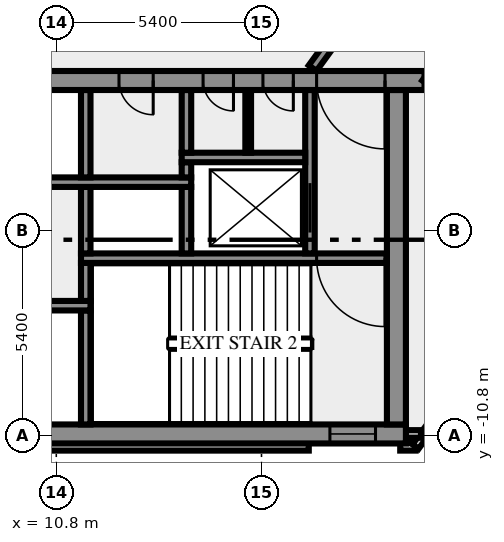
"""IFC4 building model, lengths in metres.
Left out: names, types, materials, properties, quantities, classifications, styles, units other than length and angle.
Written with IfcOpenShell. Run it as: python <this file> out.ifc"""

import sys

from ifc_helpers import new_model, si_unit, direction, frame, frame_2d, origin, place, context, subcontext, project, spatial, rectangle, extrude, element, fill, save


model = new_model("IFC4")
c1 = context("Model", 3, precision=1e-05, world=origin(), true_north=direction((0.0, 1.0)))
c2 = subcontext(c1, "Body", "Model", "MODEL_VIEW")
j1 = project(units=[si_unit("LENGTHUNIT", "METRE"), si_unit("PLANEANGLEUNIT", "RADIAN")], contexts=[c1])
p1 = place(None, origin())
s1 = spatial("IfcSite", under=j1, at=p1, CompositionType="ELEMENT")
p2 = place(p1, origin())
s2 = spatial("IfcBuilding", under=s1, at=p2, CompositionType="ELEMENT")
p3 = place(p2, frame((0.0, 0.0, 67.0)))
s3 = spatial("IfcBuildingStorey", under=s2, at=p3, CompositionType="ELEMENT", Elevation=67.0)
p4 = place(p3, frame((-17.444, -11.088, 0.0), z_axis=(0.0, 0.0, 1.0), x_axis=(1.0, 0.0, 0.0)))
e1 = element("IfcWall", 1, at=p4, inside=s3, PredefinedType="SOLIDWALL", context=c2, shape_type="SweptSolid", body=[
    extrude(rectangle(XDim=34.888, YDim=0.2, at=frame_2d((17.444, 0.0))), origin(), (0.0, 0.0, 1.0), 3.65),
])
p5 = place(p3, frame((19.85, -11.088, 0.0), z_axis=(0.0, 0.0, 1.0), x_axis=(1.0, 0.0, 0.0)))
e2 = element("IfcWall", 2, at=p5, inside=s3, PredefinedType="SOLIDWALL", context=c2, shape_type="SweptSolid", body=[
    extrude(rectangle(XDim=0.406, YDim=0.2, at=frame_2d((0.203, 0.0))), origin(), (0.0, 0.0, 1.0), 3.65),
])
p6 = place(p3, frame((20.253, -11.083, 0.0), z_axis=(0.0, 0.0, 1.0), x_axis=(0.587766567315, 0.809030569476, 0.0)))
e3 = element("IfcWall", 3, at=p6, inside=s3, PredefinedType="SOLIDWALL", context=c2, shape_type="SweptSolid", body=[
    extrude(rectangle(XDim=2.688, YDim=0.2, at=frame_2d((1.344, 0.0))), origin(), (0.0, 0.0, 1.0), 3.65),
])
p7 = place(p3, frame((19.98, -10.75, 0.0), z_axis=(0.0, 0.0, 1.0), x_axis=(1.0, 0.0, 0.0)))
e4 = element("IfcWall", 4, at=p7, inside=s3, PredefinedType="SOLIDWALL", context=c2, shape_type="SweptSolid", body=[
    extrude(rectangle(XDim=0.417, YDim=0.2, at=frame_2d((0.208, 0.0))), origin(), (0.0, 0.0, 1.0), 3.65),
])
p8 = place(p3, frame((-20.0, -10.75, 0.0), z_axis=(0.0, 0.0, 1.0), x_axis=(1.0, 0.0, 0.0)))
e5 = element("IfcWall", 5, at=p8, inside=s3, PredefinedType="SHEAR", context=c2, shape_type="SweptSolid", body=[
    extrude(rectangle(XDim=40.0, YDim=0.5, at=frame_2d((20.0, 0.0))), origin(), (0.0, 0.0, 1.0), 3.65),
])
p9 = place(p8, frame((0.8, 0.0, 1.0)))
e6 = element("IfcOpeningElement", 6, at=p9, cuts=e5, PredefinedType="OPENING", context=c2, shape_type="SweptSolid", body=[
    extrude(rectangle(XDim=1.2, YDim=1.2, at=frame_2d((0.6, 0.6))), frame((0.0, 0.26, 0.0), z_axis=(0.0, -1.0, 0.0), x_axis=(1.0, 0.0, 0.0)), (0.0, 0.0, 1.0), 0.52),
])
p10 = place(p8, frame((38.0, 0.0, 1.0)))
e7 = element("IfcOpeningElement", 7, at=p10, cuts=e5, PredefinedType="OPENING", context=c2, shape_type="SweptSolid", body=[
    extrude(rectangle(XDim=1.2, YDim=1.2, at=frame_2d((0.6, 0.6))), frame((0.0, 0.26, 0.0), z_axis=(0.0, -1.0, 0.0), x_axis=(1.0, 0.0, 0.0)), (0.0, 0.0, 1.0), 0.52),
])
p11 = place(p3, frame((11.575, -10.5, 0.0), z_axis=(0.0, 0.0, 1.0), x_axis=(0.0, 1.0, 0.0)))
e8 = element("IfcWall", 8, at=p11, inside=s3, PredefinedType="SHEAR", context=c2, shape_type="SweptSolid", body=[
    extrude(rectangle(XDim=3.0, YDim=0.25, at=frame_2d((1.5, 0.0))), origin(), (0.0, 0.0, 1.0), 3.65),
])
p12 = place(p3, frame((19.75, -10.5, 0.0), z_axis=(0.0, 0.0, 1.0), x_axis=(0.0, 1.0, 0.0)))
e9 = element("IfcWall", 9, at=p12, inside=s3, PredefinedType="SHEAR", context=c2, shape_type="SweptSolid", body=[
    extrude(rectangle(XDim=8.8, YDim=0.5, at=frame_2d((4.4, 0.0))), origin(), (0.0, 0.0, 1.0), 3.65),
])
p13 = place(p3, frame((11.7, -7.375, 0.0), z_axis=(0.0, 0.0, 1.0), x_axis=(-1.0, 0.0, 0.0)))
e10 = element("IfcWall", 10, at=p13, inside=s3, PredefinedType="SHEAR", context=c2, shape_type="SweptSolid", body=[
    extrude(rectangle(XDim=23.4, YDim=0.25, at=frame_2d((11.7, 0.0))), origin(), (0.0, 0.0, 1.0), 3.65),
])
p14 = place(p13, frame((21.45, 0.0, 0.0)))
e11 = element("IfcOpeningElement", 11, at=p14, cuts=e10, PredefinedType="OPENING", context=c2, shape_type="SweptSolid", body=[
    extrude(rectangle(XDim=1.1, YDim=2.1, at=frame_2d((0.55, 1.05))), frame((0.0, 0.135, 0.0), z_axis=(0.0, -1.0, 0.0), x_axis=(1.0, 0.0, 0.0)), (0.0, 0.0, 1.0), 0.27),
])
p15 = place(p13, frame((18.95, 0.0, 0.0)))
e12 = element("IfcOpeningElement", 12, at=p15, cuts=e10, PredefinedType="OPENING", context=c2, shape_type="SweptSolid", body=[
    extrude(rectangle(XDim=1.1, YDim=2.1, at=frame_2d((0.55, 1.05))), frame((0.0, 0.135, 0.0), z_axis=(0.0, -1.0, 0.0), x_axis=(1.0, 0.0, 0.0)), (0.0, 0.0, 1.0), 0.27),
])
p16 = place(p13, frame((16.45, 0.0, 0.0)))
e13 = element("IfcOpeningElement", 13, at=p16, cuts=e10, PredefinedType="OPENING", context=c2, shape_type="SweptSolid", body=[
    extrude(rectangle(XDim=1.1, YDim=2.1, at=frame_2d((0.55, 1.05))), frame((0.0, 0.135, 0.0), z_axis=(0.0, -1.0, 0.0), x_axis=(1.0, 0.0, 0.0)), (0.0, 0.0, 1.0), 0.27),
])
p17 = place(p13, frame((14.65, 0.0, 0.0)))
e14 = element("IfcOpeningElement", 14, at=p17, cuts=e10, PredefinedType="OPENING", context=c2, shape_type="SweptSolid", body=[
    extrude(rectangle(XDim=0.8, YDim=2.1, at=frame_2d((0.4, 1.05))), frame((0.0, 0.135, 0.0), z_axis=(0.0, -1.0, 0.0), x_axis=(1.0, 0.0, 0.0)), (0.0, 0.0, 1.0), 0.27),
])
p18 = place(p13, frame((12.8, 0.0, 0.0)))
e15 = element("IfcOpeningElement", 15, at=p18, cuts=e10, PredefinedType="OPENING", context=c2, shape_type="SweptSolid", body=[
    extrude(rectangle(XDim=0.9, YDim=2.1, at=frame_2d((0.45, 1.05))), frame((0.0, 0.135, 0.0), z_axis=(0.0, -1.0, 0.0), x_axis=(1.0, 0.0, 0.0)), (0.0, 0.0, 1.0), 0.27),
])
p19 = place(p13, frame((10.7, 0.0, 0.0)))
e16 = element("IfcOpeningElement", 16, at=p19, cuts=e10, PredefinedType="OPENING", context=c2, shape_type="SweptSolid", body=[
    extrude(rectangle(XDim=0.9, YDim=2.1, at=frame_2d((0.45, 1.05))), frame((0.0, 0.135, 0.0), z_axis=(0.0, -1.0, 0.0), x_axis=(1.0, 0.0, 0.0)), (0.0, 0.0, 1.0), 0.27),
])
p20 = place(p3, frame((11.575, -7.25, 0.0), z_axis=(0.0, 0.0, 1.0), x_axis=(0.0, 1.0, 0.0)))
e17 = element("IfcWall", 17, at=p20, inside=s3, PredefinedType="SHEAR", context=c2, shape_type="SweptSolid", body=[
    extrude(rectangle(XDim=1.0, YDim=0.25, at=frame_2d((0.5, 0.0))), origin(), (0.0, 0.0, 1.0), 3.65),
])
p21 = place(p3, frame((19.5, -6.125, 0.0), z_axis=(0.0, 0.0, 1.0), x_axis=(-1.0, 0.0, 0.0)))
e18 = element("IfcWall", 18, at=p21, inside=s3, PredefinedType="SHEAR", context=c2, shape_type="SweptSolid", body=[
    extrude(rectangle(XDim=8.05, YDim=0.25, at=frame_2d((4.025, 0.0))), origin(), (0.0, 0.0, 1.0), 3.65),
])
p22 = place(p21, frame((0.05, 0.0, 0.0)))
e19 = element("IfcOpeningElement", 19, at=p22, cuts=e18, PredefinedType="OPENING", context=c2, shape_type="SweptSolid", body=[
    extrude(rectangle(XDim=1.8, YDim=2.1, at=frame_2d((0.9, 1.05))), frame((0.0, 0.135, 0.0), z_axis=(0.0, -1.0, 0.0), x_axis=(1.0, 0.0, 0.0)), (0.0, 0.0, 1.0), 0.27),
])
for number, where, z_axis, x_axis in (
    (20, (11.575, -6.0, 0.0), (0.0, 0.0, 1.0), (0.0, 1.0, 0.0)),
    (21, (14.225, -6.0, 0.0), (0.0, 0.0, 1.0), (0.0, 1.0, 0.0)),
):
    element("IfcWall", number, at=place(p3, frame(where, z_axis=z_axis, x_axis=x_axis)), inside=s3, PredefinedType="SHEAR", context=c2, shape_type="SweptSolid", body=[
        extrude(rectangle(XDim=1.75, YDim=0.25, at=frame_2d((0.875, 0.0))), origin(), (0.0, 0.0, 1.0), 3.65),
    ])
p23 = place(p3, frame((17.475, -6.0, 0.0), z_axis=(0.0, 0.0, 1.0), x_axis=(0.0, 1.0, 0.0)))
e22 = element("IfcWall", 22, at=p23, inside=s3, PredefinedType="SHEAR", context=c2, shape_type="SweptSolid", body=[
    extrude(rectangle(XDim=4.3, YDim=0.25, at=frame_2d((2.15, 0.0))), origin(), (0.0, 0.0, 1.0), 3.65),
])
p24 = place(p23, frame((0.55, 0.0, 0.0)))
e23 = element("IfcOpeningElement", 23, at=p24, cuts=e22, PredefinedType="OPENING", context=c2, shape_type="SweptSolid", body=[
    extrude(rectangle(XDim=1.3, YDim=2.1, at=frame_2d((0.65, 1.05))), frame((0.0, 0.135, 0.0), z_axis=(0.0, -1.0, 0.0), x_axis=(1.0, 0.0, 0.0)), (0.0, 0.0, 1.0), 0.27),
])
p25 = place(p3, frame((-0.6, -4.125, 0.0), z_axis=(0.0, 0.0, 1.0), x_axis=(1.0, 0.0, 0.0)))
e24 = element("IfcWall", 24, at=p25, inside=s3, PredefinedType="SHEAR", context=c2, shape_type="SweptSolid", body=[
    extrude(rectangle(XDim=14.95, YDim=0.25, at=frame_2d((7.475, 0.0))), origin(), (0.0, 0.0, 1.0), 3.65),
])
p26 = place(p25, frame((2.75, 0.0, 0.0)))
e25 = element("IfcOpeningElement", 25, at=p26, cuts=e24, PredefinedType="OPENING", context=c2, shape_type="SweptSolid", body=[
    extrude(rectangle(XDim=1.3, YDim=2.1, at=frame_2d((0.65, 1.05))), frame((0.0, 0.135, 0.0), z_axis=(0.0, -1.0, 0.0), x_axis=(1.0, 0.0, 0.0)), (0.0, 0.0, 1.0), 0.27),
])
p27 = place(p3, frame((11.575, -4.0, 0.0), z_axis=(0.0, 0.0, 1.0), x_axis=(0.0, 1.0, 0.0)))
e26 = element("IfcWall", 26, at=p27, inside=s3, PredefinedType="SHEAR", context=c2, shape_type="SweptSolid", body=[
    extrude(rectangle(XDim=2.3, YDim=0.25, at=frame_2d((1.15, 0.0))), origin(), (0.0, 0.0, 1.0), 3.65),
])
p28 = place(p3, frame((14.225, -4.0, 0.0), z_axis=(0.0, 0.0, 1.0), x_axis=(0.0, 1.0, 0.0)))
e27 = element("IfcWall", 27, at=p28, inside=s3, PredefinedType="SHEAR", context=c2, shape_type="SweptSolid", body=[
    extrude(rectangle(XDim=0.4, YDim=0.25, at=frame_2d((0.2, 0.0))), origin(), (0.0, 0.0, 1.0), 3.65),
])
p29 = place(p3, frame((14.1, -3.475, 0.0), z_axis=(0.0, 0.0, 1.0), x_axis=(1.0, 0.0, 0.0)))
e28 = element("IfcWall", 28, at=p29, inside=s3, PredefinedType="SHEAR", context=c2, shape_type="SweptSolid", body=[
    extrude(rectangle(XDim=3.25, YDim=0.25, at=frame_2d((1.625, 0.0))), origin(), (0.0, 0.0, 1.0), 3.65),
])
p30 = place(p3, frame((14.225, -3.35, 0.0), z_axis=(0.0, 0.0, 1.0), x_axis=(0.0, 1.0, 0.0)))
e29 = element("IfcWall", 29, at=p30, inside=s3, PredefinedType="SHEAR", context=c2, shape_type="SweptSolid", body=[
    extrude(rectangle(XDim=1.65, YDim=0.25, at=frame_2d((0.825, 0.0))), origin(), (0.0, 0.0, 1.0), 3.65),
])
p31 = place(p3, frame((15.85, -3.35, 0.0), z_axis=(0.0, 0.0, 1.0), x_axis=(0.0, 1.0, 0.0)))
e30 = element("IfcWall", 30, at=p31, inside=s3, PredefinedType="PARTITIONING", context=c2, shape_type="SweptSolid", body=[
    extrude(rectangle(XDim=1.65, YDim=0.15, at=frame_2d((0.825, 0.0))), origin(), (0.0, 0.0, 1.0), 3.65),
])
p32 = place(p3, frame((20.49, -1.45, 0.0), z_axis=(0.0, 0.0, 1.0), x_axis=(-1.0, 0.0, 0.0)))
e31 = element("IfcWall", 31, at=p32, inside=s3, PredefinedType="SHEAR", context=c2, shape_type="SweptSolid", body=[
    extrude(rectangle(XDim=40.98, YDim=0.5, at=frame_2d((20.49, 0.0))), origin(), (0.0, 0.0, 1.0), 3.65),
])
p33 = place(p32, frame((38.14, 0.0, 0.0)))
e32 = element("IfcOpeningElement", 32, at=p33, cuts=e31, PredefinedType="OPENING", context=c2, shape_type="SweptSolid", body=[
    extrude(rectangle(XDim=1.8, YDim=2.1, at=frame_2d((0.9, 1.05))), frame((0.0, 0.26, 0.0), z_axis=(0.0, -1.0, 0.0), x_axis=(1.0, 0.0, 0.0)), (0.0, 0.0, 1.0), 0.52),
])
p34 = place(p32, frame((35.89, 0.0, 0.0)))
e33 = element("IfcOpeningElement", 33, at=p34, cuts=e31, PredefinedType="OPENING", context=c2, shape_type="SweptSolid", body=[
    extrude(rectangle(XDim=0.9, YDim=2.1, at=frame_2d((0.45, 1.05))), frame((0.0, 0.26, 0.0), z_axis=(0.0, -1.0, 0.0), x_axis=(1.0, 0.0, 0.0)), (0.0, 0.0, 1.0), 0.52),
])
p35 = place(p32, frame((32.94, 0.0, 0.0)))
e34 = element("IfcOpeningElement", 34, at=p35, cuts=e31, PredefinedType="OPENING", context=c2, shape_type="SweptSolid", body=[
    extrude(rectangle(XDim=0.9, YDim=2.1, at=frame_2d((0.45, 1.05))), frame((0.0, 0.26, 0.0), z_axis=(0.0, -1.0, 0.0), x_axis=(1.0, 0.0, 0.0)), (0.0, 0.0, 1.0), 0.52),
])
p36 = place(p32, frame((21.765, 0.0, 0.0)))
e35 = element("IfcOpeningElement", 35, at=p36, cuts=e31, PredefinedType="OPENING", context=c2, shape_type="SweptSolid", body=[
    extrude(rectangle(XDim=2.0, YDim=2.1, at=frame_2d((1.0, 1.05))), frame((0.0, 0.26, 0.0), z_axis=(0.0, -1.0, 0.0), x_axis=(1.0, 0.0, 0.0)), (0.0, 0.0, 1.0), 0.52),
])
p37 = place(p32, frame((7.14, 0.0, 0.0)))
e36 = element("IfcOpeningElement", 36, at=p37, cuts=e31, PredefinedType="OPENING", context=c2, shape_type="SweptSolid", body=[
    extrude(rectangle(XDim=0.9, YDim=2.1, at=frame_2d((0.45, 1.05))), frame((0.0, 0.26, 0.0), z_axis=(0.0, -1.0, 0.0), x_axis=(1.0, 0.0, 0.0)), (0.0, 0.0, 1.0), 0.52),
])
p38 = place(p32, frame((5.028, 0.0, 0.0)))
e37 = element("IfcOpeningElement", 37, at=p38, cuts=e31, PredefinedType="OPENING", context=c2, shape_type="SweptSolid", body=[
    extrude(rectangle(XDim=0.8, YDim=2.1, at=frame_2d((0.4, 1.05))), frame((0.0, 0.26, 0.0), z_axis=(0.0, -1.0, 0.0), x_axis=(1.0, 0.0, 0.0)), (0.0, 0.0, 1.0), 0.52),
])
p39 = place(p32, frame((3.452, 0.0, 0.0)))
e38 = element("IfcOpeningElement", 38, at=p39, cuts=e31, PredefinedType="OPENING", context=c2, shape_type="SweptSolid", body=[
    extrude(rectangle(XDim=0.8, YDim=2.1, at=frame_2d((0.4, 1.05))), frame((0.0, 0.26, 0.0), z_axis=(0.0, -1.0, 0.0), x_axis=(1.0, 0.0, 0.0)), (0.0, 0.0, 1.0), 0.52),
])
p40 = place(p32, frame((1.04, 0.0, 0.0)))
e39 = element("IfcOpeningElement", 39, at=p40, cuts=e31, PredefinedType="OPENING", context=c2, shape_type="SweptSolid", body=[
    extrude(rectangle(XDim=1.8, YDim=2.1, at=frame_2d((0.9, 1.05))), frame((0.0, 0.26, 0.0), z_axis=(0.0, -1.0, 0.0), x_axis=(1.0, 0.0, 0.0)), (0.0, 0.0, 1.0), 0.52),
])
p41 = place(p3, frame((17.545, -1.125, 0.0), z_axis=(0.0, 0.0, 1.0), x_axis=(0.587786323093, 0.809016216391, 0.0)))
e40 = element("IfcWall", 40, at=p41, inside=s3, PredefinedType="SOLIDWALL", context=c2, shape_type="SweptSolid", body=[
    extrude(rectangle(XDim=33.493, YDim=0.25, at=frame_2d((16.747, 0.0))), origin(), (0.0, 0.0, 1.0), 3.65),
])
p42 = place(p41, frame((27.458, 0.0, 0.0)))
e41 = element("IfcOpeningElement", 41, at=p42, cuts=e40, PredefinedType="OPENING", context=c2, shape_type="SweptSolid", body=[
    extrude(rectangle(XDim=1.8, YDim=2.1, at=frame_2d((0.9, 1.05))), frame((0.0, 0.135, 0.0), z_axis=(0.0, -1.0, 0.0), x_axis=(1.0, 0.0, 0.0)), (0.0, 0.0, 1.0), 0.27),
])
p43 = place(p41, frame((3.392, 0.0, 0.0)))
e42 = element("IfcOpeningElement", 42, at=p43, cuts=e40, PredefinedType="OPENING", context=c2, shape_type="SweptSolid", body=[
    extrude(rectangle(XDim=1.8, YDim=2.1, at=frame_2d((0.9, 1.05))), frame((0.0, 0.135, 0.0), z_axis=(0.0, -1.0, 0.0), x_axis=(1.0, 0.0, 0.0)), (0.0, 0.0, 1.0), 0.27),
])
p44 = place(p41, frame((32.253, 0.0, 0.0)))
e43 = element("IfcOpeningElement", 43, at=p44, cuts=e40, PredefinedType="OPENING", context=c2, shape_type="SweptSolid", body=[
    extrude(rectangle(XDim=0.9, YDim=2.1, at=frame_2d((0.45, 1.05))), frame((0.0, 0.135, 0.0), z_axis=(0.0, -1.0, 0.0), x_axis=(1.0, 0.0, 0.0)), (0.0, 0.0, 1.0), 0.27),
])
p45 = place(p3, frame((43.467, 30.045, 0.0), z_axis=(0.0, 0.0, 1.0), x_axis=(-0.587784726077, -0.809017376692, 0.0)))
e44 = element("IfcWall", 44, at=p45, inside=s3, PredefinedType="SOLIDWALL", context=c2, shape_type="SweptSolid", body=[
    extrude(rectangle(XDim=39.02, YDim=0.25, at=frame_2d((19.51, 0.0))), origin(), (0.0, 0.0, 1.0), 3.65),
])
p46 = place(p45, frame((26.254, 0.0, 0.0)))
e45 = element("IfcOpeningElement", 45, at=p46, cuts=e44, PredefinedType="OPENING", context=c2, shape_type="SweptSolid", body=[
    extrude(rectangle(XDim=0.9, YDim=2.1, at=frame_2d((0.45, 1.05))), frame((0.0, 0.135, 0.0), z_axis=(0.0, -1.0, 0.0), x_axis=(1.0, 0.0, 0.0)), (0.0, 0.0, 1.0), 0.27),
])
p47 = place(p45, frame((2.205, 0.0, 0.0)))
e46 = element("IfcOpeningElement", 46, at=p47, cuts=e44, PredefinedType="OPENING", context=c2, shape_type="SweptSolid", body=[
    extrude(rectangle(XDim=0.9, YDim=2.1, at=frame_2d((0.45, 1.05))), frame((0.0, 0.135, 0.0), z_axis=(0.0, -1.0, 0.0), x_axis=(1.0, 0.0, 0.0)), (0.0, 0.0, 1.0), 0.27),
])
p48 = place(p45, frame((27.855, 0.0, 0.0)))
e47 = element("IfcOpeningElement", 47, at=p48, cuts=e44, PredefinedType="OPENING", context=c2, shape_type="SweptSolid", body=[
    extrude(rectangle(XDim=0.9, YDim=2.1, at=frame_2d((0.45, 1.05))), frame((0.0, 0.135, 0.0), z_axis=(0.0, -1.0, 0.0), x_axis=(1.0, 0.0, 0.0)), (0.0, 0.0, 1.0), 0.27),
])
p49 = place(p45, frame((18.155, 0.0, 0.0)))
e48 = element("IfcOpeningElement", 48, at=p49, cuts=e44, PredefinedType="OPENING", context=c2, shape_type="SweptSolid", body=[
    extrude(rectangle(XDim=0.9, YDim=2.1, at=frame_2d((0.45, 1.05))), frame((0.0, 0.135, 0.0), z_axis=(0.0, -1.0, 0.0), x_axis=(1.0, 0.0, 0.0)), (0.0, 0.0, 1.0), 0.27),
])
p50 = place(p45, frame((19.755, 0.0, 0.0)))
e49 = element("IfcOpeningElement", 49, at=p50, cuts=e44, PredefinedType="OPENING", context=c2, shape_type="SweptSolid", body=[
    extrude(rectangle(XDim=0.9, YDim=2.1, at=frame_2d((0.45, 1.05))), frame((0.0, 0.135, 0.0), z_axis=(0.0, -1.0, 0.0), x_axis=(1.0, 0.0, 0.0)), (0.0, 0.0, 1.0), 0.27),
])
p51 = place(p45, frame((0.224, 0.0, 0.0)))
e50 = element("IfcOpeningElement", 50, at=p51, cuts=e44, PredefinedType="OPENING", context=c2, shape_type="SweptSolid", body=[
    extrude(rectangle(XDim=0.9, YDim=2.1, at=frame_2d((0.45, 1.05))), frame((0.0, 0.135, 0.0), z_axis=(0.0, -1.0, 0.0), x_axis=(1.0, 0.0, 0.0)), (0.0, 0.0, 1.0), 0.27),
])
p52 = place(p10, origin())
e51 = element("IfcWindow", 51, at=p52, inside=s3, PartitioningType="SINGLE_PANEL", PredefinedType="WINDOW", context=c2, shape_type="SweptSolid", body=[
    extrude(rectangle(XDim=1.2, YDim=1.2, at=frame_2d((0.6, 0.6))), frame((0.0, 0.03, 0.0), z_axis=(0.0, -1.0, 0.0), x_axis=(1.0, 0.0, 0.0)), (0.0, 0.0, 1.0), 0.06),
])
fill(e7, e51)
p53 = place(p22, origin())
e52 = element("IfcDoor", 52, at=p53, inside=s3, OperationType="DOUBLE_DOOR_SINGLE_SWING", PredefinedType="DOOR", context=c2, shape_type="SweptSolid", body=[
    extrude(rectangle(XDim=1.8, YDim=2.1, at=frame_2d((0.9, 1.05))), frame((0.0, 0.025, 0.0), z_axis=(0.0, -1.0, 0.0), x_axis=(1.0, 0.0, 0.0)), (0.0, 0.0, 1.0), 0.05),
])
fill(e19, e52)
p54 = place(p24, origin())
e53 = element("IfcDoor", 53, at=p54, inside=s3, OperationType="DOUBLE_DOOR_SLIDING", PredefinedType="DOOR", context=c2, shape_type="SweptSolid", body=[
    extrude(rectangle(XDim=1.3, YDim=2.1, at=frame_2d((0.65, 1.05))), frame((0.0, 0.025, 0.0), z_axis=(0.0, -1.0, 0.0), x_axis=(1.0, 0.0, 0.0)), (0.0, 0.0, 1.0), 0.05),
])
fill(e23, e53)
p55 = place(p37, origin())
e54 = element("IfcDoor", 54, at=p55, inside=s3, OperationType="SINGLE_SWING_LEFT", PredefinedType="DOOR", context=c2, shape_type="SweptSolid", body=[
    extrude(rectangle(XDim=0.9, YDim=2.1, at=frame_2d((0.45, 1.05))), frame((0.0, 0.025, 0.0), z_axis=(0.0, -1.0, 0.0), x_axis=(1.0, 0.0, 0.0)), (0.0, 0.0, 1.0), 0.05),
])
fill(e36, e54)
p56 = place(p38, origin())
e55 = element("IfcDoor", 55, at=p56, inside=s3, OperationType="SINGLE_SWING_LEFT", PredefinedType="DOOR", context=c2, shape_type="SweptSolid", body=[
    extrude(rectangle(XDim=0.8, YDim=2.1, at=frame_2d((0.4, 1.05))), frame((0.0, 0.025, 0.0), z_axis=(0.0, -1.0, 0.0), x_axis=(1.0, 0.0, 0.0)), (0.0, 0.0, 1.0), 0.05),
])
fill(e37, e55)
p57 = place(p39, origin())
e56 = element("IfcDoor", 56, at=p57, inside=s3, OperationType="SINGLE_SWING_LEFT", PredefinedType="DOOR", context=c2, shape_type="SweptSolid", body=[
    extrude(rectangle(XDim=0.8, YDim=2.1, at=frame_2d((0.4, 1.05))), frame((0.0, 0.025, 0.0), z_axis=(0.0, -1.0, 0.0), x_axis=(1.0, 0.0, 0.0)), (0.0, 0.0, 1.0), 0.05),
])
fill(e38, e56)
p58 = place(p40, origin())
e57 = element("IfcDoor", 57, at=p58, inside=s3, OperationType="DOUBLE_DOOR_SINGLE_SWING", PredefinedType="DOOR", context=c2, shape_type="SweptSolid", body=[
    extrude(rectangle(XDim=1.8, YDim=2.1, at=frame_2d((0.9, 1.05))), frame((0.0, 0.025, 0.0), z_axis=(0.0, -1.0, 0.0), x_axis=(1.0, 0.0, 0.0)), (0.0, 0.0, 1.0), 0.05),
])
fill(e39, e57)
save(model, sys.argv[1])
